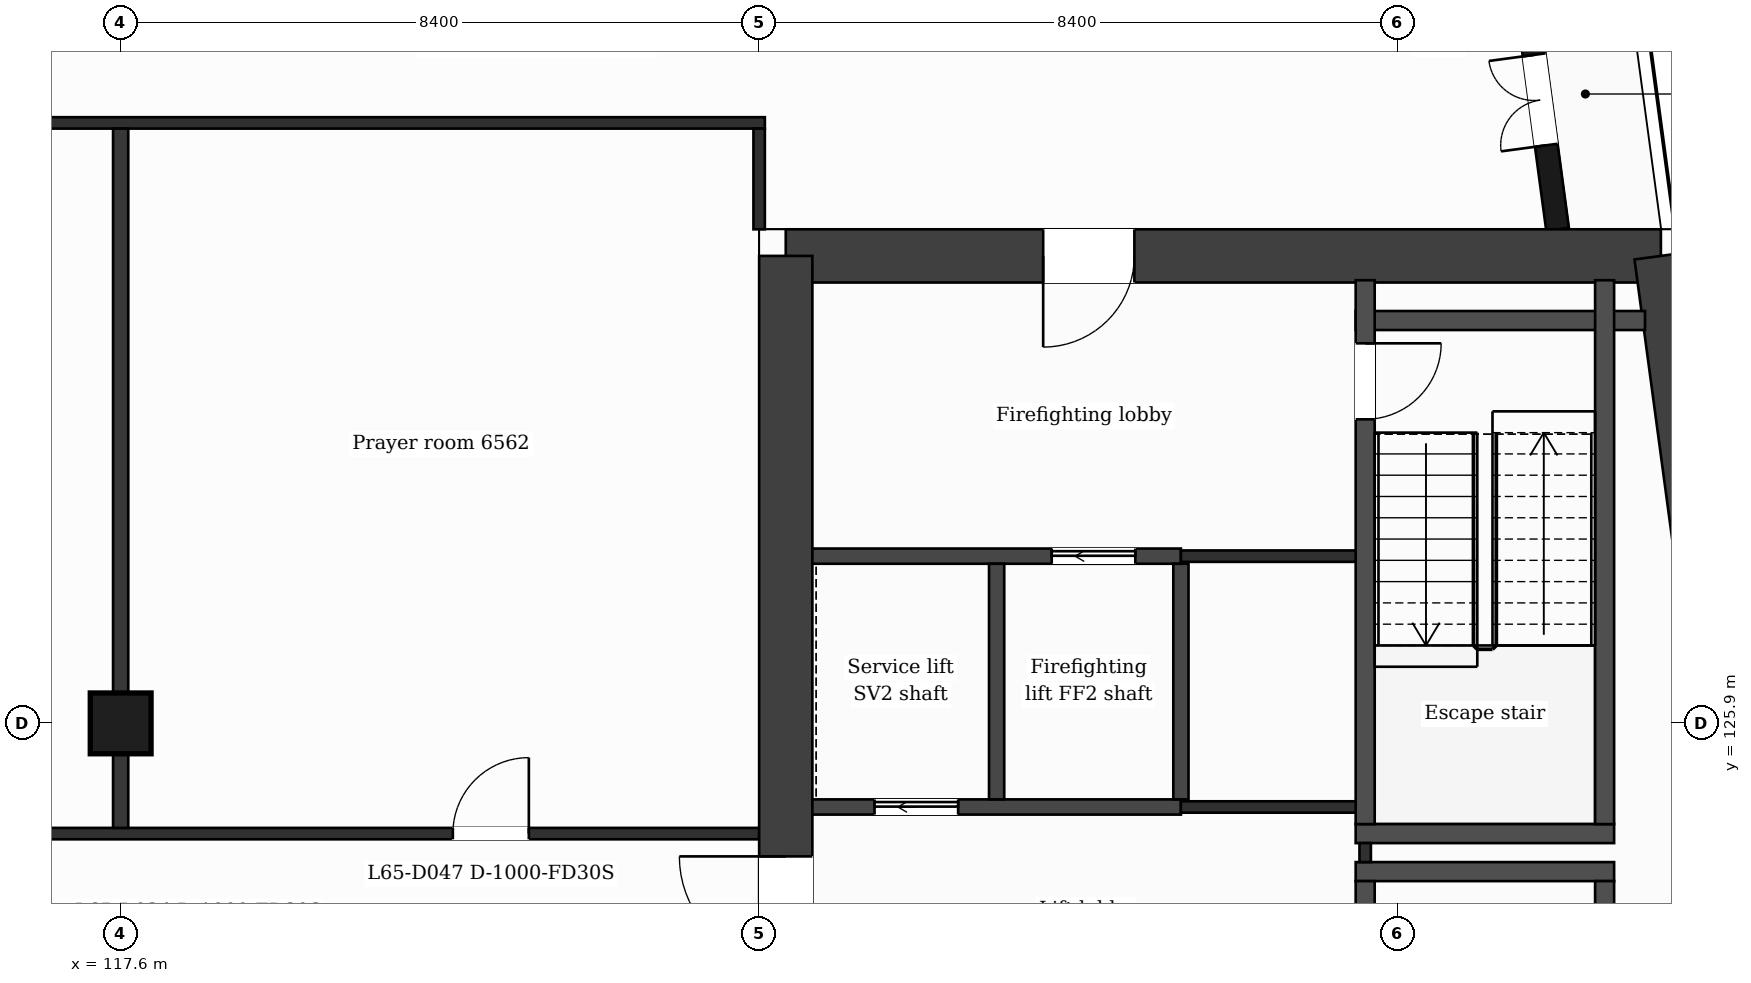
"""IFC4 building model, lengths in metres.
Left out: names, types, materials, properties, quantities, classifications, styles, units other than length and angle.
Written with IfcOpenShell. Run it as: python <this file> out.ifc"""

import sys

from ifc_helpers import new_model, si_unit, direction, frame, frame_2d, origin, origin_2d, place, context, subcontext, project, spatial, rectangle, extrude, element, fill, save


model = new_model("IFC4")
c1 = context("Model", 3, precision=1e-05, world=origin(), true_north=direction((0.0, 1.0)))
c2 = subcontext(c1, "Body", "Model", "MODEL_VIEW")
j1 = project(units=[si_unit("LENGTHUNIT", "METRE"), si_unit("PLANEANGLEUNIT", "RADIAN")], contexts=[c1])
p1 = place(None, origin())
s1 = spatial("IfcSite", under=j1, at=p1, CompositionType="ELEMENT")
p2 = place(p1, origin())
s2 = spatial("IfcBuilding", under=s1, at=p2, CompositionType="ELEMENT")
p3 = place(p2, frame((0.0, 0.0, 270.1)))
s3 = spatial("IfcBuildingStorey", under=s2, at=p3, CompositionType="ELEMENT", Elevation=270.1)
p4 = place(p3, frame((126.35, 132.05, 0.0), z_axis=(0.0, 0.0, 1.0), x_axis=(1.0, 0.0, 0.0)))
e1 = element("IfcWall", 1, at=p4, inside=s3, PredefinedType="SHEAR", context=c2, shape_type="SweptSolid", body=[
    extrude(rectangle(XDim=11.513, YDim=0.7, at=frame_2d((5.757, 0.0))), origin(), (0.0, 0.0, 1.0), 3.7),
])
p5 = place(p4, frame((3.386, 0.0, 0.0)))
e2 = element("IfcOpeningElement", 2, at=p5, cuts=e1, PredefinedType="OPENING", context=c2, shape_type="SweptSolid", body=[
    extrude(rectangle(XDim=1.2, YDim=2.1, at=frame_2d((0.6, 1.05))), frame((0.0, 0.36, 0.0), z_axis=(0.0, -1.0, 0.0), x_axis=(1.0, 0.0, 0.0)), (0.0, 0.0, 1.0), 0.72),
])
p6 = place(p3, frame((137.863, 132.05, 0.0), z_axis=(0.0, 0.0, 1.0), x_axis=(0.133406218907, -0.991061441464, 0.0)))
e3 = element("IfcWall", 3, at=p6, inside=s3, PredefinedType="SHEAR", context=c2, shape_type="SweptSolid", body=[
    extrude(rectangle(XDim=21.492, YDim=0.7, at=frame_2d((10.746, 0.0))), origin(), (0.0, 0.0, 1.0), 3.7),
])
p7 = place(p3, frame((126.35, 110.75, 0.0), z_axis=(0.0, 0.0, 1.0), x_axis=(0.0, 1.0, 0.0)))
e4 = element("IfcWall", 4, at=p7, inside=s3, PredefinedType="SHEAR", context=c2, shape_type="SweptSolid", body=[
    extrude(rectangle(XDim=21.3, YDim=0.7, at=frame_2d((10.65, 0.0))), origin(), (0.0, 0.0, 1.0), 3.7),
])
p8 = place(p7, frame((12.0, 0.0, 0.0)))
e5 = element("IfcOpeningElement", 5, at=p8, cuts=e4, PredefinedType="OPENING", context=c2, shape_type="SweptSolid", body=[
    extrude(rectangle(XDim=1.4, YDim=2.1, at=frame_2d((0.7, 1.05))), frame((0.0, 0.36, 0.0), z_axis=(0.0, -1.0, 0.0), x_axis=(1.0, 0.0, 0.0)), (0.0, 0.0, 1.0), 0.72),
])
p9 = place(p3, frame((117.6, 125.9, 0.0), z_axis=(0.0, 0.0, 1.0), x_axis=(1.0, 0.0, 0.0)))
e6 = element("IfcColumn", 6, at=p9, inside=s3, PredefinedType="COLUMN", context=c2, shape_type="SweptSolid", body=[
    extrude(rectangle(XDim=0.8, YDim=0.8, at=origin_2d()), origin(), (0.0, 0.0, 1.0), 3.7),
])
p10 = place(p3, frame((136.504, 132.4, 0.0), z_axis=(0.0, 0.0, 1.0), x_axis=(-0.133399697462, 0.99106231929, 0.0)))
e7 = element("IfcWall", 7, at=p10, inside=s3, PredefinedType="SOLIDWALL", context=c2, shape_type="SweptSolid", body=[
    extrude(rectangle(XDim=6.74, YDim=0.3, at=frame_2d((3.37, 0.0))), origin(), (0.0, 0.0, 1.0), 3.38),
])
p11 = place(p10, frame((1.115, 0.0, 0.0)))
e8 = element("IfcOpeningElement", 8, at=p11, cuts=e7, PredefinedType="OPENING", context=c2, shape_type="SweptSolid", body=[
    extrude(rectangle(XDim=1.2, YDim=2.4, at=frame_2d((0.6, 1.2))), frame((0.0, 0.16, 0.0), z_axis=(0.0, -1.0, 0.0), x_axis=(1.0, 0.0, 0.0)), (0.0, 0.0, 1.0), 0.32),
])
p12 = place(p10, frame((4.436, 0.0, 0.9)))
e9 = element("IfcOpeningElement", 9, at=p12, cuts=e7, PredefinedType="OPENING", context=c2, shape_type="SweptSolid", body=[
    extrude(rectangle(XDim=1.2, YDim=2.1, at=frame_2d((0.6, 1.05))), frame((0.0, 0.16, 0.0), z_axis=(0.0, -1.0, 0.0), x_axis=(1.0, 0.0, 0.0)), (0.0, 0.0, 1.0), 0.32),
])
for number, where, z_axis, x_axis in (
    (10, (133.848, 123.95, 0.0), (0.0, 0.0, 1.0), (1.0, 0.0, 0.0)),
    (11, (133.848, 124.45, 0.0), (0.0, 0.0, 1.0), (1.0, 0.0, 0.0)),
):
    element("IfcWall", number, at=place(p3, frame(where, z_axis=z_axis, x_axis=x_axis)), inside=s3, PredefinedType="PARTITIONING", context=c2, shape_type="SweptSolid", body=[
        extrude(rectangle(XDim=3.4, YDim=0.25, at=frame_2d((1.7, 0.0))), origin(), (0.0, 0.0, 1.0), 3.38),
    ])
p13 = place(p3, frame((100.8, 124.45, 0.0), z_axis=(0.0, 0.0, 1.0), x_axis=(1.0, 0.0, 0.0)))
e12 = element("IfcWall", 12, at=p13, inside=s3, PredefinedType="PARTITIONING", context=c2, shape_type="SweptSolid", body=[
    extrude(rectangle(XDim=25.2, YDim=0.15, at=frame_2d((12.6, 0.0))), origin(), (0.0, 0.0, 1.0), 3.38),
])
p14 = place(p13, frame((6.125, 0.0, 0.0)))
e13 = element("IfcOpeningElement", 13, at=p14, cuts=e12, PredefinedType="OPENING", context=c2, shape_type="SweptSolid", body=[
    extrude(rectangle(XDim=1.0, YDim=2.1, at=frame_2d((0.5, 1.05))), frame((0.0, 0.085, 0.0), z_axis=(0.0, -1.0, 0.0), x_axis=(1.0, 0.0, 0.0)), (0.0, 0.0, 1.0), 0.17),
])
p15 = place(p13, frame((1.325, 0.0, 0.0)))
e14 = element("IfcOpeningElement", 14, at=p15, cuts=e12, PredefinedType="OPENING", context=c2, shape_type="SweptSolid", body=[
    extrude(rectangle(XDim=1.0, YDim=2.1, at=frame_2d((0.5, 1.05))), frame((0.0, 0.085, 0.0), z_axis=(0.0, -1.0, 0.0), x_axis=(1.0, 0.0, 0.0)), (0.0, 0.0, 1.0), 0.17),
])
p16 = place(p13, frame((11.43, 0.0, 0.0)))
e15 = element("IfcOpeningElement", 15, at=p16, cuts=e12, PredefinedType="OPENING", context=c2, shape_type="SweptSolid", body=[
    extrude(rectangle(XDim=1.0, YDim=2.1, at=frame_2d((0.5, 1.05))), frame((0.0, 0.085, 0.0), z_axis=(0.0, -1.0, 0.0), x_axis=(1.0, 0.0, 0.0)), (0.0, 0.0, 1.0), 0.17),
])
p17 = place(p13, frame((21.17, 0.0, 0.0)))
e16 = element("IfcOpeningElement", 16, at=p17, cuts=e12, PredefinedType="OPENING", context=c2, shape_type="SweptSolid", body=[
    extrude(rectangle(XDim=1.0, YDim=2.1, at=frame_2d((0.5, 1.05))), frame((0.0, 0.085, 0.0), z_axis=(0.0, -1.0, 0.0), x_axis=(1.0, 0.0, 0.0)), (0.0, 0.0, 1.0), 0.17),
])
p18 = place(p3, frame((126.7, 124.8, 0.0), z_axis=(0.0, 0.0, 1.0), x_axis=(1.0, 0.0, 0.0)))
e17 = element("IfcWall", 17, at=p18, inside=s3, PredefinedType="PARTITIONING", context=c2, shape_type="SweptSolid", body=[
    extrude(rectangle(XDim=4.849, YDim=0.2, at=frame_2d((2.424, 0.0))), origin(), (0.0, 0.0, 1.0), 3.38),
])
p19 = place(p18, frame((0.818, 0.0, 0.0)))
e18 = element("IfcOpeningElement", 18, at=p19, cuts=e17, PredefinedType="OPENING", context=c2, shape_type="SweptSolid", body=[
    extrude(rectangle(XDim=1.1, YDim=2.1, at=frame_2d((0.55, 1.05))), frame((0.0, 0.11, 0.0), z_axis=(0.0, -1.0, 0.0), x_axis=(1.0, 0.0, 0.0)), (0.0, 0.0, 1.0), 0.22),
])
p20 = place(p3, frame((131.549, 124.8, 0.0), z_axis=(0.0, 0.0, 1.0), x_axis=(1.0, 0.0, 0.0)))
e19 = element("IfcWall", 19, at=p20, inside=s3, PredefinedType="PARTITIONING", context=c2, shape_type="SweptSolid", body=[
    extrude(rectangle(XDim=2.549, YDim=0.15, at=frame_2d((1.275, 0.0))), origin(), (0.0, 0.0, 1.0), 3.38),
])
p21 = place(p3, frame((126.7, 128.1, 0.0), z_axis=(0.0, 0.0, 1.0), x_axis=(1.0, 0.0, 0.0)))
e20 = element("IfcWall", 20, at=p21, inside=s3, PredefinedType="PARTITIONING", context=c2, shape_type="SweptSolid", body=[
    extrude(rectangle(XDim=4.849, YDim=0.2, at=frame_2d((2.424, 0.0))), origin(), (0.0, 0.0, 1.0), 3.38),
])
p22 = place(p21, frame((3.149, 0.0, 0.0)))
e21 = element("IfcOpeningElement", 21, at=p22, cuts=e20, PredefinedType="OPENING", context=c2, shape_type="SweptSolid", body=[
    extrude(rectangle(XDim=1.1, YDim=2.1, at=frame_2d((0.55, 1.05))), frame((0.0, 0.11, 0.0), z_axis=(0.0, -1.0, 0.0), x_axis=(1.0, 0.0, 0.0)), (0.0, 0.0, 1.0), 0.22),
])
p23 = place(p3, frame((131.549, 128.1, 0.0), z_axis=(0.0, 0.0, 1.0), x_axis=(1.0, 0.0, 0.0)))
e22 = element("IfcWall", 22, at=p23, inside=s3, PredefinedType="PARTITIONING", context=c2, shape_type="SweptSolid", body=[
    extrude(rectangle(XDim=2.424, YDim=0.15, at=frame_2d((1.212, 0.0))), origin(), (0.0, 0.0, 1.0), 3.38),
])
p24 = place(p3, frame((133.848, 131.2, 0.0), z_axis=(0.0, 0.0, 1.0), x_axis=(1.0, 0.0, 0.0)))
e23 = element("IfcWall", 23, at=p24, inside=s3, PredefinedType="PARTITIONING", context=c2, shape_type="SweptSolid", body=[
    extrude(rectangle(XDim=3.807, YDim=0.25, at=frame_2d((1.903, 0.0))), origin(), (0.0, 0.0, 1.0), 3.38),
])
p25 = place(p3, frame((100.725, 133.8, 0.0), z_axis=(0.0, 0.0, 1.0), x_axis=(1.0, 0.0, 0.0)))
e24 = element("IfcWall", 24, at=p25, inside=s3, PredefinedType="PARTITIONING", context=c2, shape_type="SweptSolid", body=[
    extrude(rectangle(XDim=25.35, YDim=0.15, at=frame_2d((12.675, 0.0))), origin(), (0.0, 0.0, 1.0), 3.38),
])
p26 = place(p3, frame((117.6, 124.525, 0.0), z_axis=(0.0, 0.0, 1.0), x_axis=(0.0, 1.0, 0.0)))
e25 = element("IfcWall", 25, at=p26, inside=s3, PredefinedType="PARTITIONING", context=c2, shape_type="SweptSolid", body=[
    extrude(rectangle(XDim=9.2, YDim=0.2, at=frame_2d((4.6, 0.0))), origin(), (0.0, 0.0, 1.0), 3.38),
])
p27 = place(p3, frame((126.0, 132.4, 0.0), z_axis=(0.0, 0.0, 1.0), x_axis=(0.0, 1.0, 0.0)))
e26 = element("IfcWall", 26, at=p27, inside=s3, PredefinedType="PARTITIONING", context=c2, shape_type="SweptSolid", body=[
    extrude(rectangle(XDim=1.325, YDim=0.15, at=frame_2d((0.663, 0.0))), origin(), (0.0, 0.0, 1.0), 3.38),
])
for number, where, z_axis, x_axis in (
    (27, (129.124, 124.9, 0.0), (0.0, 0.0, 1.0), (0.0, 1.0, 0.0)),
    (28, (131.549, 124.9, 0.0), (0.0, 0.0, 1.0), (0.0, 1.0, 0.0)),
):
    element("IfcWall", number, at=place(p3, frame(where, z_axis=z_axis, x_axis=x_axis)), inside=s3, PredefinedType="PARTITIONING", context=c2, shape_type="SweptSolid", body=[
        extrude(rectangle(XDim=3.1, YDim=0.2, at=frame_2d((1.55, 0.0))), origin(), (0.0, 0.0, 1.0), 3.38),
    ])
p28 = place(p3, frame((133.973, 124.075, 0.0), z_axis=(0.0, 0.0, 1.0), x_axis=(0.0, 1.0, 0.0)))
e29 = element("IfcWall", 29, at=p28, inside=s3, PredefinedType="PARTITIONING", context=c2, shape_type="SweptSolid", body=[
    extrude(rectangle(XDim=0.25, YDim=0.15, at=frame_2d((0.125, 0.0))), origin(), (0.0, 0.0, 1.0), 3.38),
])
p29 = place(p3, frame((133.973, 116.67, 0.0), z_axis=(0.0, 0.0, 1.0), x_axis=(0.0, 1.0, 0.0)))
e30 = element("IfcWall", 30, at=p29, inside=s3, PredefinedType="PARTITIONING", context=c2, shape_type="SweptSolid", body=[
    extrude(rectangle(XDim=7.155, YDim=0.25, at=frame_2d((3.578, 0.0))), origin(), (0.0, 0.0, 1.0), 3.38),
])
p30 = place(p29, frame((5.855, 0.0, 0.0)))
e31 = element("IfcOpeningElement", 31, at=p30, cuts=e30, PredefinedType="OPENING", context=c2, shape_type="SweptSolid", body=[
    extrude(rectangle(XDim=0.95, YDim=2.1, at=frame_2d((0.475, 1.05))), frame((0.0, 0.135, 0.0), z_axis=(0.0, -1.0, 0.0), x_axis=(1.0, 0.0, 0.0)), (0.0, 0.0, 1.0), 0.27),
])
p31 = place(p3, frame((133.973, 124.575, 0.0), z_axis=(0.0, 0.0, 1.0), x_axis=(0.0, 1.0, 0.0)))
e32 = element("IfcWall", 32, at=p31, inside=s3, PredefinedType="PARTITIONING", context=c2, shape_type="SweptSolid", body=[
    extrude(rectangle(XDim=7.155, YDim=0.25, at=frame_2d((3.578, 0.0))), origin(), (0.0, 0.0, 1.0), 3.38),
])
p32 = place(p31, frame((5.325, 0.0, 0.0)))
e33 = element("IfcOpeningElement", 33, at=p32, cuts=e32, PredefinedType="OPENING", context=c2, shape_type="SweptSolid", body=[
    extrude(rectangle(XDim=1.0, YDim=2.1, at=frame_2d((0.5, 1.05))), frame((0.0, 0.135, 0.0), z_axis=(0.0, -1.0, 0.0), x_axis=(1.0, 0.0, 0.0)), (0.0, 0.0, 1.0), 0.27),
])
for number, where, z_axis, x_axis in (
    (34, (137.123, 116.67, 0.0), (0.0, 0.0, 1.0), (0.0, 1.0, 0.0)),
    (35, (137.123, 124.575, 0.0), (0.0, 0.0, 1.0), (0.0, 1.0, 0.0)),
):
    element("IfcWall", number, at=place(p3, frame(where, z_axis=z_axis, x_axis=x_axis)), inside=s3, PredefinedType="PARTITIONING", context=c2, shape_type="SweptSolid", body=[
        extrude(rectangle(XDim=7.155, YDim=0.25, at=frame_2d((3.578, 0.0))), origin(), (0.0, 0.0, 1.0), 3.38),
    ])
p33 = place(p11, origin())
e36 = element("IfcDoor", 36, at=p33, inside=s3, OperationType="DOUBLE_DOOR_SINGLE_SWING", PredefinedType="DOOR", context=c2, shape_type="SweptSolid", body=[
    extrude(rectangle(XDim=1.2, YDim=2.4, at=frame_2d((0.6, 1.2))), frame((0.0, 0.025, 0.0), z_axis=(0.0, -1.0, 0.0), x_axis=(1.0, 0.0, 0.0)), (0.0, 0.0, 1.0), 0.05),
])
fill(e8, e36)
p34 = place(p22, origin())
e37 = element("IfcDoor", 37, at=p34, inside=s3, OperationType="SLIDING_TO_LEFT", PredefinedType="DOOR", context=c2, shape_type="SweptSolid", body=[
    extrude(rectangle(XDim=1.1, YDim=2.1, at=frame_2d((0.55, 1.05))), frame((0.0, 0.025, 0.0), z_axis=(0.0, -1.0, 0.0), x_axis=(1.0, 0.0, 0.0)), (0.0, 0.0, 1.0), 0.05),
])
fill(e21, e37)
p35 = place(p19, origin())
e38 = element("IfcDoor", 38, at=p35, inside=s3, OperationType="SLIDING_TO_LEFT", PredefinedType="DOOR", context=c2, shape_type="SweptSolid", body=[
    extrude(rectangle(XDim=1.1, YDim=2.1, at=frame_2d((0.55, 1.05))), frame((0.0, 0.025, 0.0), z_axis=(0.0, -1.0, 0.0), x_axis=(1.0, 0.0, 0.0)), (0.0, 0.0, 1.0), 0.05),
])
fill(e18, e38)
p36 = place(p32, origin())
e39 = element("IfcDoor", 39, at=p36, inside=s3, OperationType="SINGLE_SWING_RIGHT", PredefinedType="DOOR", context=c2, shape_type="SweptSolid", body=[
    extrude(rectangle(XDim=1.0, YDim=2.1, at=frame_2d((0.5, 1.05))), frame((0.0, 0.025, 0.0), z_axis=(0.0, -1.0, 0.0), x_axis=(1.0, 0.0, 0.0)), (0.0, 0.0, 1.0), 0.05),
])
fill(e33, e39)
p37 = place(p17, origin())
e40 = element("IfcDoor", 40, at=p37, inside=s3, OperationType="SINGLE_SWING_RIGHT", PredefinedType="DOOR", context=c2, shape_type="SweptSolid", body=[
    extrude(rectangle(XDim=1.0, YDim=2.1, at=frame_2d((0.5, 1.05))), frame((0.0, 0.025, 0.0), z_axis=(0.0, -1.0, 0.0), x_axis=(1.0, 0.0, 0.0)), (0.0, 0.0, 1.0), 0.05),
])
fill(e16, e40)
p38 = place(p5, origin())
e41 = element("IfcDoor", 41, at=p38, inside=s3, OperationType="SINGLE_SWING_LEFT", PredefinedType="DOOR", context=c2, shape_type="SweptSolid", body=[
    extrude(rectangle(XDim=1.2, YDim=2.1, at=frame_2d((0.6, 1.05))), frame((0.0, 0.025, 0.0), z_axis=(0.0, -1.0, 0.0), x_axis=(1.0, 0.0, 0.0)), (0.0, 0.0, 1.0), 0.05),
])
fill(e2, e41)
p39 = place(p8, origin())
e42 = element("IfcDoor", 42, at=p39, inside=s3, OperationType="SINGLE_SWING_RIGHT", PredefinedType="DOOR", context=c2, shape_type="SweptSolid", body=[
    extrude(rectangle(XDim=1.4, YDim=2.1, at=frame_2d((0.7, 1.05))), frame((0.0, 0.025, 0.0), z_axis=(0.0, -1.0, 0.0), x_axis=(1.0, 0.0, 0.0)), (0.0, 0.0, 1.0), 0.05),
])
fill(e5, e42)
save(model, sys.argv[1])
